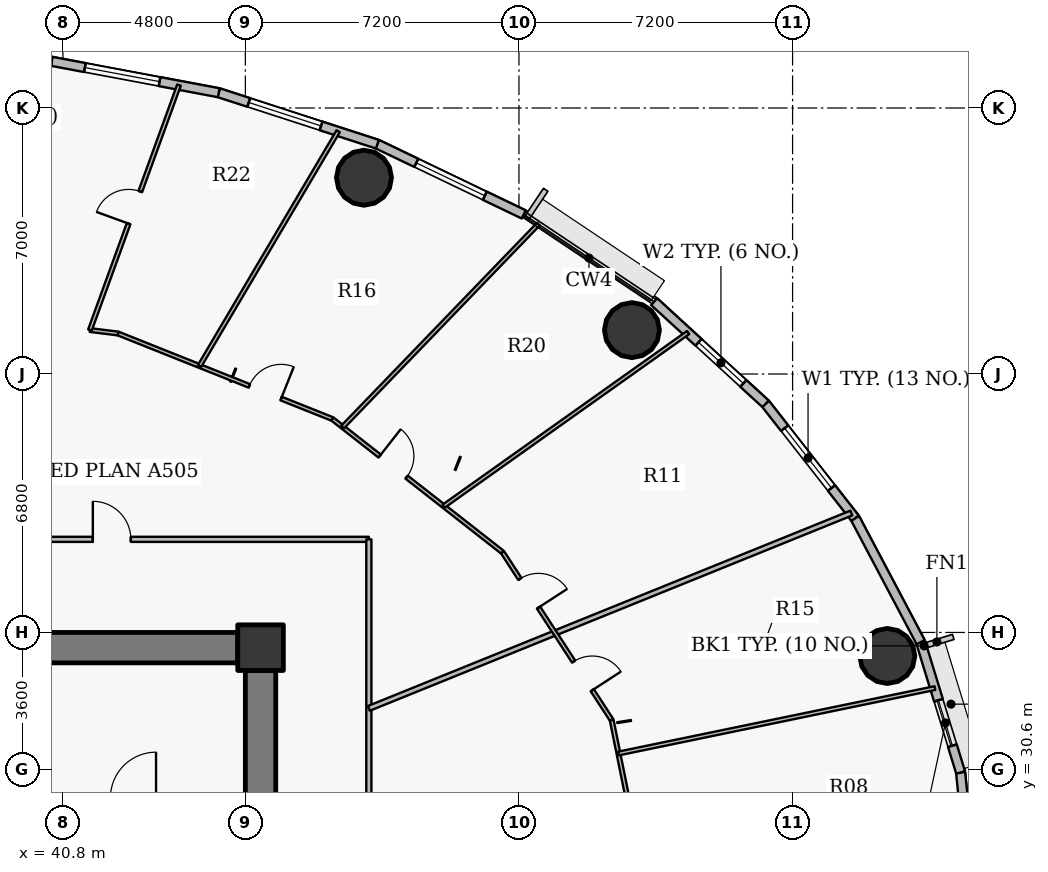
"""IFC4 building model, lengths in metres.
Left out: names, types, materials, properties, quantities, classifications, styles, units other than length and angle.
Written with IfcOpenShell. Run it as: python <this file> out.ifc"""

import sys

from ifc_helpers import new_model, si_unit, direction, frame, frame_2d, origin, origin_2d, place, context, subcontext, project, spatial, rectangle, hollow_circle, extrude, source, transform, mapped, element, fill, save


model = new_model("IFC4")
c1 = context("Model", 3, precision=1e-05, world=origin(), true_north=direction((0.0, 1.0)))
c2 = subcontext(c1, "Body", "Model", "MODEL_VIEW")
j1 = project(units=[si_unit("LENGTHUNIT", "METRE"), si_unit("PLANEANGLEUNIT", "RADIAN")], contexts=[c1])
p1 = place(None, origin())
s1 = spatial("IfcSite", under=j1, at=p1, CompositionType="ELEMENT")
p2 = place(p1, origin())
s2 = spatial("IfcBuilding", under=s1, at=p2, CompositionType="ELEMENT")
p3 = place(p2, frame((0.0, 0.0, 130.95)))
s3 = spatial("IfcBuildingStorey", under=s2, at=p3, CompositionType="ELEMENT", Elevation=130.95)
p4 = place(p3, frame((46.0, 33.8, 0.0), z_axis=(0.0, 0.0, 1.0), x_axis=(1.0, 0.0, 0.0)))
e1 = element("IfcColumn", 1, at=p4, inside=s3, PredefinedType="COLUMN", context=c2, shape_type="SweptSolid", body=[
    extrude(rectangle(XDim=1.2, YDim=1.2, at=origin_2d()), origin(), (0.0, 0.0, 1.0), 3.75),
])
p5 = place(p3, frame((26.6, 33.8, 0.0), z_axis=(0.0, 0.0, 1.0), x_axis=(1.0, 0.0, 0.0)))
e2 = element("IfcWall", 2, at=p5, inside=s3, PredefinedType="SHEAR", context=c2, shape_type="SweptSolid", body=[
    extrude(rectangle(XDim=18.8, YDim=0.8, at=frame_2d((9.4, 0.0))), origin(), (0.0, 0.0, 1.0), 2.95),
])
p6 = place(p3, frame((46.0, 33.2, 0.0), z_axis=(0.0, 0.0, 1.0), x_axis=(0.0, -1.0, 0.0)))
e3 = element("IfcWall", 3, at=p6, inside=s3, PredefinedType="SHEAR", context=c2, shape_type="SweptSolid", body=[
    extrude(rectangle(XDim=12.4, YDim=0.8, at=frame_2d((6.2, 0.0))), origin(), (0.0, 0.0, 1.0), 2.95),
])
p7 = place(p6, frame((5.79, 0.0, 0.0)))
e4 = element("IfcOpeningElement", 4, at=p7, cuts=e3, PredefinedType="OPENING", context=c2, shape_type="SweptSolid", body=[
    extrude(rectangle(XDim=0.82, YDim=2.1, at=origin_2d()), frame((0.41, 0.41, 1.05), z_axis=(0.0, -1.0, 0.0), x_axis=(1.0, 0.0, 0.0)), (0.0, 0.0, 1.0), 0.82),
])
for number, where, z_axis, x_axis in (
    (5, (62.493, 33.581, 0.0), (0.0, 0.0, 1.0), (1.0, 0.0, 0.0)),
    (6, (55.773, 42.156, 0.0), (0.0, 0.0, 1.0), (1.0, 0.0, 0.0)),
    (7, (48.722, 46.165, 0.0), (0.0, 0.0, 1.0), (1.0, 0.0, 0.0)),
):
    element("IfcColumn", number, at=place(p3, frame(where, z_axis=z_axis, x_axis=x_axis)), inside=s3, PredefinedType="COLUMN", context=c2, shape_type="SweptSolid", body=[
        extrude(hollow_circle(Radius=0.725, WallThickness=0.042, at=origin_2d()), origin(), (0.0, 0.0, 1.0), 3.75),
    ])
p8 = place(p3, frame((64.422, 30.515, 0.0), z_axis=(0.0, 0.0, 1.0), x_axis=(0.099989468229, -0.994988495533, 0.0)))
e8 = element("IfcWall", 8, at=p8, inside=s3, PredefinedType="SOLIDWALL", context=c2, shape_type="SweptSolid", body=[
    extrude(rectangle(XDim=3.533, YDim=0.24, at=frame_2d((1.767, 0.0))), origin(), (0.0, 0.0, 1.0), 3.5),
])
p9 = place(p3, frame((63.37, 33.945, 0.0), z_axis=(0.0, 0.0, 1.0), x_axis=(0.293124431344, -0.956074300329, 0.0)))
e9 = element("IfcWall", 9, at=p9, inside=s3, PredefinedType="SOLIDWALL", context=c2, shape_type="SweptSolid", body=[
    extrude(rectangle(XDim=3.587, YDim=0.24, at=frame_2d((1.793, 0.0))), origin(), (0.0, 0.0, 1.0), 3.5),
])
p10 = place(p9, frame((1.599, 0.0, 0.9)))
e10 = element("IfcOpeningElement", 10, at=p10, cuts=e9, PredefinedType="OPENING", context=c2, shape_type="SweptSolid", body=[
    extrude(rectangle(XDim=1.25, YDim=1.65, at=origin_2d()), frame((0.625, 0.13, 0.825), z_axis=(0.0, -1.0, 0.0), x_axis=(1.0, 0.0, 0.0)), (0.0, 0.0, 1.0), 0.26),
])
p11 = place(p3, frame((61.645, 37.206, 0.0), z_axis=(0.0, 0.0, 1.0), x_axis=(0.467614004126, -0.883932770716, 0.0)))
e11 = element("IfcWall", 11, at=p11, inside=s3, PredefinedType="SOLIDWALL", context=c2, shape_type="SweptSolid", body=[
    extrude(rectangle(XDim=3.689, YDim=0.24, at=frame_2d((1.844, 0.0))), origin(), (0.0, 0.0, 1.0), 3.5),
])
p12 = place(p3, frame((59.289, 40.217, 0.0), z_axis=(0.0, 0.0, 1.0), x_axis=(0.616272103517, -0.787533297345, 0.0)))
e12 = element("IfcWall", 12, at=p12, inside=s3, PredefinedType="SOLIDWALL", context=c2, shape_type="SweptSolid", body=[
    extrude(rectangle(XDim=3.823, YDim=0.24, at=frame_2d((1.912, 0.0))), origin(), (0.0, 0.0, 1.0), 3.5),
])
p13 = place(p12, frame((0.814, 0.0, 0.9)))
e13 = element("IfcOpeningElement", 13, at=p13, cuts=e12, PredefinedType="OPENING", context=c2, shape_type="SweptSolid", body=[
    extrude(rectangle(XDim=2.0, YDim=1.75, at=origin_2d()), frame((1.0, 0.13, 0.875), z_axis=(0.0, -1.0, 0.0), x_axis=(1.0, 0.0, 0.0)), (0.0, 0.0, 1.0), 0.26),
])
p14 = place(p3, frame((56.358, 42.903, 0.0), z_axis=(0.0, 0.0, 1.0), x_axis=(0.737113356241, -0.675769117414, 0.0)))
e14 = element("IfcWall", 14, at=p14, inside=s3, PredefinedType="SOLIDWALL", context=c2, shape_type="SweptSolid", body=[
    extrude(rectangle(XDim=3.976, YDim=0.24, at=frame_2d((1.988, 0.0))), origin(), (0.0, 0.0, 1.0), 3.5),
])
p15 = place(p14, frame((1.583, 0.0, 0.9)))
e15 = element("IfcOpeningElement", 15, at=p15, cuts=e14, PredefinedType="OPENING", context=c2, shape_type="SweptSolid", body=[
    extrude(rectangle(XDim=1.6, YDim=1.75, at=origin_2d()), frame((0.8, 0.13, 0.875), z_axis=(0.0, -1.0, 0.0), x_axis=(1.0, 0.0, 0.0)), (0.0, 0.0, 1.0), 0.26),
])
p16 = place(p3, frame((49.074, 47.047, 0.0), z_axis=(0.0, 0.0, 1.0), x_axis=(0.901589935876, -0.432591709962, 0.0)))
e16 = element("IfcWall", 16, at=p16, inside=s3, PredefinedType="SOLIDWALL", context=c2, shape_type="SweptSolid", body=[
    extrude(rectangle(XDim=4.272, YDim=0.24, at=frame_2d((2.136, 0.0))), origin(), (0.0, 0.0, 1.0), 3.5),
])
p17 = place(p16, frame((1.136, 0.0, 0.9)))
e17 = element("IfcOpeningElement", 17, at=p17, cuts=e16, PredefinedType="OPENING", context=c2, shape_type="SweptSolid", body=[
    extrude(rectangle(XDim=2.0, YDim=1.75, at=origin_2d()), frame((1.0, 0.13, 0.875), z_axis=(0.0, -1.0, 0.0), x_axis=(1.0, 0.0, 0.0)), (0.0, 0.0, 1.0), 0.26),
])
p18 = place(p3, frame((44.9, 48.401, 0.0), z_axis=(0.0, 0.0, 1.0), x_axis=(0.951211346073, -0.308540070495, 0.0)))
e18 = element("IfcWall", 18, at=p18, inside=s3, PredefinedType="SOLIDWALL", context=c2, shape_type="SweptSolid", body=[
    extrude(rectangle(XDim=4.388, YDim=0.24, at=frame_2d((2.194, 0.0))), origin(), (0.0, 0.0, 1.0), 3.5),
])
p19 = place(p18, frame((0.83, 0.0, 0.9)))
e19 = element("IfcOpeningElement", 19, at=p19, cuts=e18, PredefinedType="OPENING", context=c2, shape_type="SweptSolid", body=[
    extrude(rectangle(XDim=2.0, YDim=1.75, at=origin_2d()), frame((1.0, 0.13, 0.875), z_axis=(0.0, -1.0, 0.0), x_axis=(1.0, 0.0, 0.0)), (0.0, 0.0, 1.0), 0.26),
])
p20 = place(p3, frame((40.506, 49.227, 0.0), z_axis=(0.0, 0.0, 1.0), x_axis=(0.982789252177, -0.184730305596, 0.0)))
e20 = element("IfcWall", 20, at=p20, inside=s3, PredefinedType="SOLIDWALL", context=c2, shape_type="SweptSolid", body=[
    extrude(rectangle(XDim=4.471, YDim=0.24, at=frame_2d((2.235, 0.0))), origin(), (0.0, 0.0, 1.0), 3.5),
])
p21 = place(p20, frame((0.886, 0.0, 0.9)))
e21 = element("IfcOpeningElement", 21, at=p21, cuts=e20, PredefinedType="OPENING", context=c2, shape_type="SweptSolid", body=[
    extrude(rectangle(XDim=2.0, YDim=1.75, at=origin_2d()), frame((1.0, 0.13, 0.875), z_axis=(0.0, -1.0, 0.0), x_axis=(1.0, 0.0, 0.0)), (0.0, 0.0, 1.0), 0.26),
])
p22 = place(p3, frame((36.0, 49.505, 0.0), z_axis=(0.0, 0.0, 1.0), x_axis=(0.998107531589, -0.061492726276, 0.0)))
e22 = element("IfcWall", 22, at=p22, inside=s3, PredefinedType="SOLIDWALL", context=c2, shape_type="SweptSolid", body=[
    extrude(rectangle(XDim=4.514, YDim=0.24, at=frame_2d((2.257, 0.0))), origin(), (0.0, 0.0, 1.0), 3.5),
])
p23 = place(p22, frame((1.732, 0.0, 0.0)))
e23 = element("IfcOpeningElement", 23, at=p23, cuts=e22, PredefinedType="OPENING", context=c2, shape_type="SweptSolid", body=[
    extrude(rectangle(XDim=1.05, YDim=2.15, at=origin_2d()), frame((0.525, 0.13, 1.075), z_axis=(0.0, -1.0, 0.0), x_axis=(1.0, 0.0, 0.0)), (0.0, 0.0, 1.0), 0.26),
])
p24 = place(p3, frame((35.323, 36.65, 0.0), z_axis=(0.0, 0.0, 1.0), x_axis=(1.0, 0.0, 0.0)))
e24 = element("IfcWall", 24, at=p24, inside=s3, PredefinedType="PARTITIONING", context=c2, shape_type="SweptSolid", body=[
    extrude(rectangle(XDim=13.527, YDim=0.135, at=frame_2d((6.763, 0.0))), origin(), (0.0, 0.0, 1.0), 2.935),
])
p25 = place(p24, frame((6.263, 0.0, 0.0)))
e25 = element("IfcOpeningElement", 25, at=p25, cuts=e24, PredefinedType="OPENING", context=c2, shape_type="SweptSolid", body=[
    extrude(rectangle(XDim=1.0, YDim=2.15, at=origin_2d()), frame((0.5, 0.078, 1.075), z_axis=(0.0, -1.0, 0.0), x_axis=(1.0, 0.0, 0.0)), (0.0, 0.0, 1.0), 0.155),
])
p26 = place(p3, frame((41.511, 42.157, 0.0), z_axis=(0.0, 0.0, 1.0), x_axis=(0.992403212837, -0.123027895822, 0.0)))
e26 = element("IfcWall", 26, at=p26, inside=s3, PredefinedType="PARTITIONING", context=c2, shape_type="SweptSolid", body=[
    extrude(rectangle(XDim=0.746, YDim=0.1, at=frame_2d((0.373, 0.0))), origin(), (0.0, 0.0, 1.0), 3.5),
])
p27 = place(p3, frame((41.511, 42.157, 0.0), z_axis=(0.0, 0.0, 1.0), x_axis=(0.341680179237, 0.939816287961, 0.0)))
e27 = element("IfcWall", 27, at=p27, inside=s3, PredefinedType="PARTITIONING", context=c2, shape_type="SweptSolid", body=[
    extrude(rectangle(XDim=6.858, YDim=0.1, at=frame_2d((3.429, 0.0))), origin(), (0.0, 0.0, 1.0), 2.935),
])
p28 = place(p27, frame((2.979, 0.0, 0.0)))
e28 = element("IfcOpeningElement", 28, at=p28, cuts=e27, PredefinedType="OPENING", context=c2, shape_type="SweptSolid", body=[
    extrude(rectangle(XDim=0.9, YDim=2.1, at=origin_2d()), frame((0.45, 0.06, 1.05), z_axis=(0.0, -1.0, 0.0), x_axis=(1.0, 0.0, 0.0)), (0.0, 0.0, 1.0), 0.12),
])
p29 = place(p3, frame((42.251, 42.066, 0.0), z_axis=(0.0, 0.0, 1.0), x_axis=(0.928803554156, -0.370572473055, 0.0)))
e29 = element("IfcWall", 29, at=p29, inside=s3, PredefinedType="PARTITIONING", context=c2, shape_type="SweptSolid", body=[
    extrude(rectangle(XDim=6.072, YDim=0.1, at=frame_2d((3.036, 0.0))), origin(), (0.0, 0.0, 1.0), 2.935),
])
p30 = place(p29, frame((3.719, 0.0, 0.0)))
e30 = element("IfcOpeningElement", 30, at=p30, cuts=e29, PredefinedType="OPENING", context=c2, shape_type="SweptSolid", body=[
    extrude(rectangle(XDim=0.9, YDim=2.1, at=origin_2d()), frame((0.45, 0.06, 1.05), z_axis=(0.0, -1.0, 0.0), x_axis=(1.0, 0.0, 0.0)), (0.0, 0.0, 1.0), 0.12),
])
p31 = place(p3, frame((44.394, 41.211, 0.0), z_axis=(0.0, 0.0, 1.0), x_axis=(0.508542397454, 0.861036950422, 0.0)))
e31 = element("IfcWall", 31, at=p31, inside=s3, PredefinedType="PARTITIONING", context=c2, shape_type="SweptSolid", body=[
    extrude(rectangle(XDim=7.173, YDim=0.1, at=frame_2d((3.587, 0.0))), origin(), (0.0, 0.0, 1.0), 2.935),
])
p32 = place(p3, frame((47.891, 39.816, 0.0), z_axis=(0.0, 0.0, 1.0), x_axis=(0.787345480673, -0.616512038864, 0.0)))
e32 = element("IfcWall", 32, at=p32, inside=s3, PredefinedType="PARTITIONING", context=c2, shape_type="SweptSolid", body=[
    extrude(rectangle(XDim=5.685, YDim=0.1, at=frame_2d((2.843, 0.0))), origin(), (0.0, 0.0, 1.0), 2.935),
])
p33 = place(p32, frame((1.58, 0.0, 0.0)))
e33 = element("IfcOpeningElement", 33, at=p33, cuts=e32, PredefinedType="OPENING", context=c2, shape_type="SweptSolid", body=[
    extrude(rectangle(XDim=0.9, YDim=2.1, at=origin_2d()), frame((0.45, 0.06, 1.05), z_axis=(0.0, -1.0, 0.0), x_axis=(1.0, 0.0, 0.0)), (0.0, 0.0, 1.0), 0.12),
])
p34 = place(p3, frame((48.16, 39.605, 0.0), z_axis=(0.0, 0.0, 1.0), x_axis=(0.694278615756, 0.719706331571, 0.0)))
e34 = element("IfcWall", 34, at=p34, inside=s3, PredefinedType="PARTITIONING", context=c2, shape_type="SweptSolid", body=[
    extrude(rectangle(XDim=7.422, YDim=0.1, at=frame_2d((3.711, 0.0))), origin(), (0.0, 0.0, 1.0), 2.935),
])
p35 = place(p3, frame((48.85, 17.35, 0.0), z_axis=(0.0, 0.0, 1.0), x_axis=(0.0, 1.0, 0.0)))
e35 = element("IfcWall", 35, at=p35, inside=s3, PredefinedType="PARTITIONING", context=c2, shape_type="SweptSolid", body=[
    extrude(rectangle(XDim=19.3, YDim=0.135, at=frame_2d((9.65, 0.0))), origin(), (0.0, 0.0, 1.0), 2.935),
])
p36 = place(p35, frame((6.946, 0.0, 0.0)))
e36 = element("IfcOpeningElement", 36, at=p36, cuts=e35, PredefinedType="OPENING", context=c2, shape_type="SweptSolid", body=[
    extrude(rectangle(XDim=1.0, YDim=2.15, at=origin_2d()), frame((0.5, 0.078, 1.075), z_axis=(0.0, -1.0, 0.0), x_axis=(1.0, 0.0, 0.0)), (0.0, 0.0, 1.0), 0.155),
])
p37 = place(p3, frame((48.85, 32.202, 0.0), z_axis=(0.0, 0.0, 1.0), x_axis=(0.92691714139, 0.375266056281, 0.0)))
e37 = element("IfcWall", 37, at=p37, inside=s3, PredefinedType="PARTITIONING", context=c2, shape_type="SweptSolid", body=[
    extrude(rectangle(XDim=13.696, YDim=0.135, at=frame_2d((6.848, 0.0))), origin(), (0.0, 0.0, 1.0), 2.935),
])
p38 = place(p3, frame((50.819, 37.523, 0.0), z_axis=(0.0, 0.0, 1.0), x_axis=(0.815321486624, 0.579008526233, 0.0)))
e38 = element("IfcWall", 38, at=p38, inside=s3, PredefinedType="PARTITIONING", context=c2, shape_type="SweptSolid", body=[
    extrude(rectangle(XDim=7.89, YDim=0.1, at=frame_2d((3.945, 0.0))), origin(), (0.0, 0.0, 1.0), 2.935),
])
p39 = place(p3, frame((52.366, 36.311, 0.0), z_axis=(0.0, 0.0, 1.0), x_axis=(0.545405249109, -0.838172484781, 0.0)))
e39 = element("IfcWall", 39, at=p39, inside=s3, PredefinedType="PARTITIONING", context=c2, shape_type="SweptSolid", body=[
    extrude(rectangle(XDim=5.269, YDim=0.1, at=frame_2d((2.634, 0.0))), origin(), (0.0, 0.0, 1.0), 2.935),
])
p40 = place(p39, frame((3.432, 0.0, 0.0)))
e40 = element("IfcOpeningElement", 40, at=p40, cuts=e39, PredefinedType="OPENING", context=c2, shape_type="SweptSolid", body=[
    extrude(rectangle(XDim=0.9, YDim=2.1, at=origin_2d()), frame((0.45, 0.06, 1.05), z_axis=(0.0, -1.0, 0.0), x_axis=(1.0, 0.0, 0.0)), (0.0, 0.0, 1.0), 0.12),
])
p41 = place(p39, frame((0.838, 0.0, 0.0)))
e41 = element("IfcOpeningElement", 41, at=p41, cuts=e39, PredefinedType="OPENING", context=c2, shape_type="SweptSolid", body=[
    extrude(rectangle(XDim=0.9, YDim=2.1, at=origin_2d()), frame((0.45, 0.06, 1.05), z_axis=(0.0, -1.0, 0.0), x_axis=(1.0, 0.0, 0.0)), (0.0, 0.0, 1.0), 0.12),
])
p42 = place(p3, frame((55.24, 31.895, 0.0), z_axis=(0.0, 0.0, 1.0), x_axis=(0.198240417912, -0.980153425085, 0.0)))
e42 = element("IfcWall", 42, at=p42, inside=s3, PredefinedType="PARTITIONING", context=c2, shape_type="SweptSolid", body=[
    extrude(rectangle(XDim=4.994, YDim=0.1, at=frame_2d((2.497, 0.0))), origin(), (0.0, 0.0, 1.0), 2.935),
])
p43 = place(p3, frame((55.418, 31.015, 0.0), z_axis=(0.0, 0.0, 1.0), x_axis=(0.979291441198, 0.202455607966, 0.0)))
e43 = element("IfcWall", 43, at=p43, inside=s3, PredefinedType="PARTITIONING", context=c2, shape_type="SweptSolid", body=[
    extrude(rectangle(XDim=8.504, YDim=0.1, at=frame_2d((4.252, 0.0))), origin(), (0.0, 0.0, 1.0), 2.935),
])
p44 = place(p3, frame((46.4, 34.2, 0.0), z_axis=(0.0, 0.0, 1.0), x_axis=(-1.0, 0.0, 0.0)))
e44 = element("IfcWall", 44, at=p44, inside=s3, PredefinedType="PARTITIONING", context=c2, shape_type="SweptSolid", body=[
    extrude(rectangle(XDim=0.99, YDim=0.135, at=frame_2d((0.495, 0.0))), origin(), (0.0, 0.0, 1.0), 2.935),
])
p45 = place(p3, frame((46.4, 33.21, 0.0), z_axis=(0.0, 0.0, 1.0), x_axis=(0.0, 1.0, 0.0)))
e45 = element("IfcWall", 45, at=p45, inside=s3, PredefinedType="PARTITIONING", context=c2, shape_type="SweptSolid", body=[
    extrude(rectangle(XDim=0.683, YDim=0.135, at=frame_2d((0.341, 0.0))), origin(), (0.0, 0.0, 1.0), 3.5),
])
m1 = source(origin(), c2, "Body", "SweptSolid", [
    extrude(rectangle(XDim=1.25, YDim=1.65, at=origin_2d()), frame((0.625, 0.03, 0.825), z_axis=(0.0, -1.0, 0.0), x_axis=(1.0, 0.0, 0.0)), (0.0, 0.0, 1.0), 0.06),
])
p46 = place(p10, origin())
e46 = element("IfcWindow", 46, at=p46, inside=s3, PartitioningType="SINGLE_PANEL", PredefinedType="WINDOW", context=c2, shape_type="MappedRepresentation", body=[
    mapped(m1, transform((0.0, 0.0, 0.0), x_axis=(1.0, 0.0, 0.0), y_axis=(0.0, 1.0, 0.0), z_axis=(0.0, 0.0, 1.0), scale=1.0)),
])
fill(e10, e46)
m2 = source(origin(), c2, "Body", "SweptSolid", [
    extrude(rectangle(XDim=2.0, YDim=1.75, at=origin_2d()), frame((1.0, 0.03, 0.875), z_axis=(0.0, -1.0, 0.0), x_axis=(1.0, 0.0, 0.0)), (0.0, 0.0, 1.0), 0.06),
])
p47 = place(p13, origin())
e47 = element("IfcWindow", 47, at=p47, inside=s3, PartitioningType="DOUBLE_PANEL_VERTICAL", PredefinedType="WINDOW", context=c2, shape_type="MappedRepresentation", body=[
    mapped(m2, transform((0.0, 0.0, 0.0), x_axis=(1.0, 0.0, 0.0), y_axis=(0.0, 1.0, 0.0), z_axis=(0.0, 0.0, 1.0), scale=1.0)),
])
fill(e13, e47)
m3 = source(origin(), c2, "Body", "SweptSolid", [
    extrude(rectangle(XDim=1.6, YDim=1.75, at=origin_2d()), frame((0.8, 0.03, 0.875), z_axis=(0.0, -1.0, 0.0), x_axis=(1.0, 0.0, 0.0)), (0.0, 0.0, 1.0), 0.06),
])
p48 = place(p15, origin())
e48 = element("IfcWindow", 48, at=p48, inside=s3, PartitioningType="DOUBLE_PANEL_VERTICAL", PredefinedType="WINDOW", context=c2, shape_type="MappedRepresentation", body=[
    mapped(m3, transform((0.0, 0.0, 0.0), x_axis=(1.0, 0.0, 0.0), y_axis=(0.0, 1.0, 0.0), z_axis=(0.0, 0.0, 1.0), scale=1.0)),
])
fill(e15, e48)
p49 = place(p17, origin())
e49 = element("IfcWindow", 49, at=p49, inside=s3, PartitioningType="DOUBLE_PANEL_VERTICAL", PredefinedType="WINDOW", context=c2, shape_type="MappedRepresentation", body=[
    mapped(m2, transform((0.0, 0.0, 0.0), x_axis=(1.0, 0.0, 0.0), y_axis=(0.0, 1.0, 0.0), z_axis=(0.0, 0.0, 1.0), scale=1.0)),
])
fill(e17, e49)
p50 = place(p19, origin())
e50 = element("IfcWindow", 50, at=p50, inside=s3, PartitioningType="DOUBLE_PANEL_VERTICAL", PredefinedType="WINDOW", context=c2, shape_type="MappedRepresentation", body=[
    mapped(m2, transform((0.0, 0.0, 0.0), x_axis=(1.0, 0.0, 0.0), y_axis=(0.0, 1.0, 0.0), z_axis=(0.0, 0.0, 1.0), scale=1.0)),
])
fill(e19, e50)
p51 = place(p21, origin())
e51 = element("IfcWindow", 51, at=p51, inside=s3, PartitioningType="DOUBLE_PANEL_VERTICAL", PredefinedType="WINDOW", context=c2, shape_type="MappedRepresentation", body=[
    mapped(m2, transform((0.0, 0.0, 0.0), x_axis=(1.0, 0.0, 0.0), y_axis=(0.0, 1.0, 0.0), z_axis=(0.0, 0.0, 1.0), scale=1.0)),
])
fill(e21, e51)
m4 = source(origin(), c2, "Body", "SweptSolid", [
    extrude(rectangle(XDim=0.9, YDim=2.1, at=origin_2d()), frame((0.45, 0.025, 1.05), z_axis=(0.0, -1.0, 0.0), x_axis=(1.0, 0.0, 0.0)), (0.0, 0.0, 1.0), 0.05),
])
p52 = place(p40, origin())
e52 = element("IfcDoor", 52, at=p52, inside=s3, OperationType="SINGLE_SWING_RIGHT", PredefinedType="DOOR", context=c2, shape_type="MappedRepresentation", body=[
    mapped(m4, transform((0.0, 0.0, 0.0), x_axis=(1.0, 0.0, 0.0), y_axis=(0.0, 1.0, 0.0), z_axis=(0.0, 0.0, 1.0), scale=1.0)),
])
fill(e40, e52)
m5 = source(origin(), c2, "Body", "SweptSolid", [
    extrude(rectangle(XDim=1.0, YDim=2.15, at=origin_2d()), frame((0.5, 0.025, 1.075), z_axis=(0.0, -1.0, 0.0), x_axis=(1.0, 0.0, 0.0)), (0.0, 0.0, 1.0), 0.05),
])
p53 = place(p25, origin())
e53 = element("IfcDoor", 53, at=p53, inside=s3, OperationType="SINGLE_SWING_LEFT", PredefinedType="DOOR", context=c2, shape_type="MappedRepresentation", body=[
    mapped(m5, transform((0.0, 0.0, 0.0), x_axis=(1.0, 0.0, 0.0), y_axis=(0.0, 1.0, 0.0), z_axis=(0.0, 0.0, 1.0), scale=1.0)),
])
fill(e25, e53)
p54 = place(p41, origin())
e54 = element("IfcDoor", 54, at=p54, inside=s3, OperationType="SINGLE_SWING_RIGHT", PredefinedType="DOOR", context=c2, shape_type="MappedRepresentation", body=[
    mapped(m4, transform((0.0, 0.0, 0.0), x_axis=(1.0, 0.0, 0.0), y_axis=(0.0, 1.0, 0.0), z_axis=(0.0, 0.0, 1.0), scale=1.0)),
])
fill(e41, e54)
p55 = place(p33, origin())
e55 = element("IfcDoor", 55, at=p55, inside=s3, OperationType="SINGLE_SWING_LEFT", PredefinedType="DOOR", context=c2, shape_type="MappedRepresentation", body=[
    mapped(m4, transform((0.0, 0.0, 0.0), x_axis=(1.0, 0.0, 0.0), y_axis=(0.0, 1.0, 0.0), z_axis=(0.0, 0.0, 1.0), scale=1.0)),
])
fill(e33, e55)
p56 = place(p30, origin())
e56 = element("IfcDoor", 56, at=p56, inside=s3, OperationType="SINGLE_SWING_RIGHT", PredefinedType="DOOR", context=c2, shape_type="MappedRepresentation", body=[
    mapped(m4, transform((0.0, 0.0, 0.0), x_axis=(1.0, 0.0, 0.0), y_axis=(0.0, 1.0, 0.0), z_axis=(0.0, 0.0, 1.0), scale=1.0)),
])
fill(e30, e56)
p57 = place(p28, origin())
e57 = element("IfcDoor", 57, at=p57, inside=s3, OperationType="SINGLE_SWING_LEFT", PredefinedType="DOOR", context=c2, shape_type="MappedRepresentation", body=[
    mapped(m4, transform((0.0, 0.0, 0.0), x_axis=(1.0, 0.0, 0.0), y_axis=(0.0, 1.0, 0.0), z_axis=(0.0, 0.0, 1.0), scale=1.0)),
])
fill(e28, e57)
save(model, sys.argv[1])
